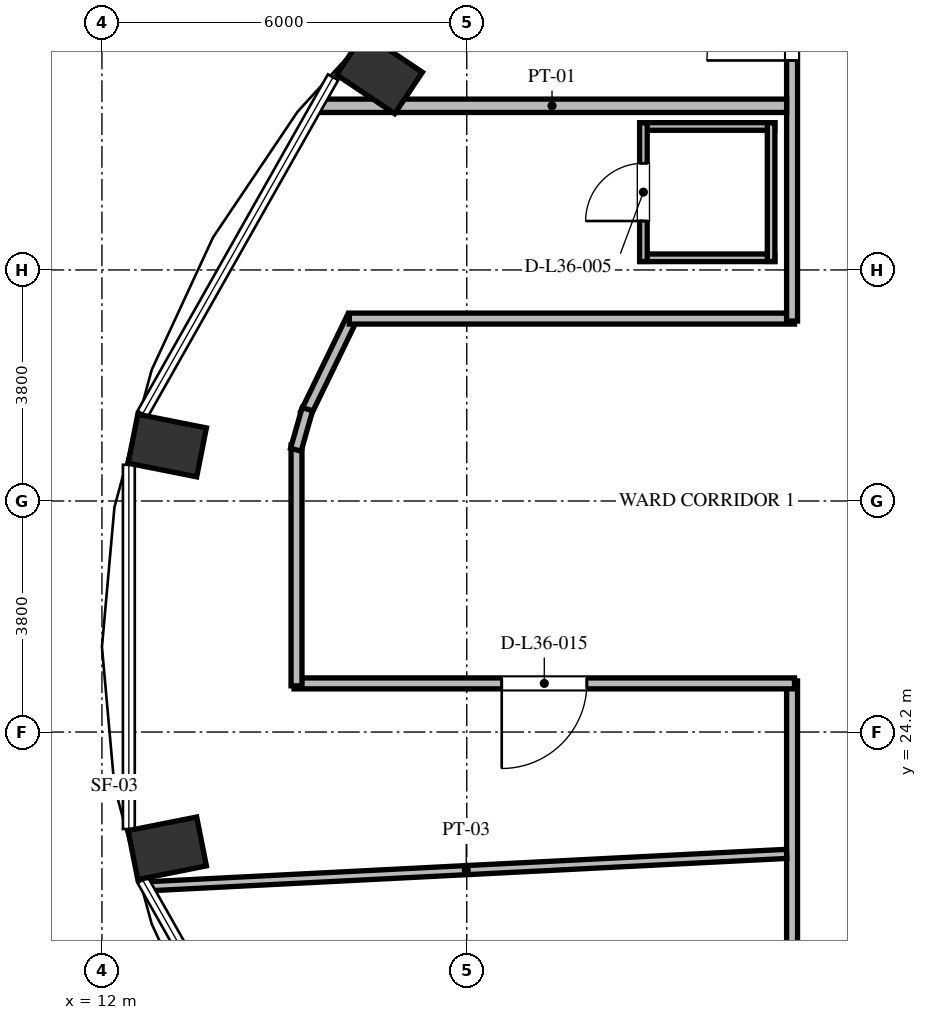
"""IFC4 building model, lengths in metres.
Left out: names, types, materials, properties, quantities, classifications, styles, units other than length and angle.
Written with IfcOpenShell. Run it as: python <this file> out.ifc"""

import sys

from ifc_helpers import new_model, si_unit, direction, frame, frame_2d, origin, origin_2d, place, context, subcontext, project, spatial, rectangle, extrude, element, fill, save


model = new_model("IFC4")
c1 = context("Model", 3, precision=1e-05, world=origin(), true_north=direction((0.0, 1.0)))
c2 = subcontext(c1, "Body", "Model", "MODEL_VIEW")
j1 = project(units=[si_unit("LENGTHUNIT", "METRE"), si_unit("PLANEANGLEUNIT", "RADIAN")], contexts=[c1])
p1 = place(None, origin())
s1 = spatial("IfcSite", under=j1, at=p1, CompositionType="ELEMENT")
p2 = place(p1, origin())
s2 = spatial("IfcBuilding", under=s1, at=p2, CompositionType="ELEMENT")
p3 = place(p2, frame((0.0, 0.0, 141.936)))
s3 = spatial("IfcBuildingStorey", under=s2, at=p3, CompositionType="ELEMENT", Elevation=141.936)
for number, where, z_axis, x_axis in (
    (1, (16.564, 35.031, 0.0), (0.0, 0.0, 1.0), (-0.831, 0.556, 0.0)),
    (2, (13.074, 28.912, 0.0), (0.0, 0.0, 1.0), (-0.981, 0.195, 0.0)),
    (3, (13.074, 22.288, 0.0), (0.0, 0.0, 1.0), (-0.981, -0.195, 0.0)),
):
    element("IfcColumn", number, at=place(p3, frame(where, z_axis=z_axis, x_axis=x_axis)), inside=s3, PredefinedType="COLUMN", context=c2, shape_type="SweptSolid", body=[
        extrude(rectangle(XDim=1.15, YDim=0.82, at=origin_2d()), origin(), (0.0, 0.0, 1.0), 3.648),
    ])
p4 = place(p3, frame((15.35, 29.436, 0.0), z_axis=(0.0, 0.0, 1.0), x_axis=(0.436196025907, 0.899851669434, 0.0)))
e4 = element("IfcWall", 4, at=p4, inside=s3, PredefinedType="PARTITIONING", context=c2, shape_type="SweptSolid", body=[
    extrude(rectangle(XDim=1.778, YDim=0.18, at=frame_2d((0.889, 0.0))), origin(), (0.0, 0.0, 1.0), 3.428),
])
p5 = place(p3, frame((16.068, 31.0, 0.0), z_axis=(0.0, 0.0, 1.0), x_axis=(1.0, 0.0, 0.0)))
e5 = element("IfcWall", 5, at=p5, inside=s3, PredefinedType="PARTITIONING", context=c2, shape_type="SweptSolid", body=[
    extrude(rectangle(XDim=7.322, YDim=0.18, at=frame_2d((3.661, 0.0))), origin(), (0.0, 0.0, 1.0), 3.428),
])
p6 = place(p3, frame((23.35, 30.96, 0.0), z_axis=(0.0, 0.0, 1.0), x_axis=(0.0, 1.0, 0.0)))
e6 = element("IfcWall", 6, at=p6, inside=s3, PredefinedType="PARTITIONING", context=c2, shape_type="SweptSolid", body=[
    extrude(rectangle(XDim=6.714, YDim=0.18, at=frame_2d((3.357, 0.0))), origin(), (0.0, 0.0, 1.0), 3.428),
])
p7 = place(p6, frame((4.285, 0.0, 0.0)))
e7 = element("IfcOpeningElement", 7, at=p7, cuts=e6, PredefinedType="OPENING", context=c2, shape_type="SweptSolid", body=[
    extrude(rectangle(XDim=1.4, YDim=2.2, at=frame_2d((0.7, 1.1))), frame((0.0, 0.1, 0.0), z_axis=(0.0, -1.0, 0.0), x_axis=(1.0, 0.0, 0.0)), (0.0, 0.0, 1.0), 0.2),
])
p8 = place(p3, frame((23.35, 19.98, 0.0), z_axis=(0.0, 0.0, 1.0), x_axis=(0.0, 1.0, 0.0)))
e8 = element("IfcWall", 8, at=p8, inside=s3, PredefinedType="PARTITIONING", context=c2, shape_type="SweptSolid", body=[
    extrude(rectangle(XDim=5.06, YDim=0.18, at=frame_2d((2.53, 0.0))), origin(), (0.0, 0.0, 1.0), 3.428),
])
p9 = place(p3, frame((23.39, 25.0, 0.0), z_axis=(0.0, 0.0, 1.0), x_axis=(-1.0, 0.0, 0.0)))
e9 = element("IfcWall", 9, at=p9, inside=s3, PredefinedType="PARTITIONING", context=c2, shape_type="SweptSolid", body=[
    extrude(rectangle(XDim=8.23, YDim=0.18, at=frame_2d((4.115, 0.0))), origin(), (0.0, 0.0, 1.0), 3.428),
])
p10 = place(p9, frame((3.415, 0.0, 0.0)))
e10 = element("IfcOpeningElement", 10, at=p10, cuts=e9, PredefinedType="OPENING", context=c2, shape_type="SweptSolid", body=[
    extrude(rectangle(XDim=1.4, YDim=2.2, at=frame_2d((0.7, 1.1))), frame((0.0, 0.1, 0.0), z_axis=(0.0, -1.0, 0.0), x_axis=(1.0, 0.0, 0.0)), (0.0, 0.0, 1.0), 0.2),
])
p11 = place(p3, frame((15.2, 24.96, 0.0), z_axis=(0.0, 0.0, 1.0), x_axis=(0.0, 1.0, 0.0)))
e11 = element("IfcWall", 11, at=p11, inside=s3, PredefinedType="PARTITIONING", context=c2, shape_type="SweptSolid", body=[
    extrude(rectangle(XDim=3.961, YDim=0.18, at=frame_2d((1.98, 0.0))), origin(), (0.0, 0.0, 1.0), 3.428),
])
p12 = place(p3, frame((15.189, 28.843, 0.0), z_axis=(0.0, 0.0, 1.0), x_axis=(0.272862960331, 0.962052911684, 0.0)))
e12 = element("IfcWall", 12, at=p12, inside=s3, PredefinedType="PARTITIONING", context=c2, shape_type="SweptSolid", body=[
    extrude(rectangle(XDim=0.694, YDim=0.18, at=frame_2d((0.347, 0.0))), origin(), (0.0, 0.0, 1.0), 3.428),
])
p13 = place(p3, frame((12.723, 21.661, 0.0), z_axis=(0.0, 0.0, 1.0), x_axis=(0.998712791022, 0.050722391981, 0.0)))
e13 = element("IfcWall", 13, at=p13, inside=s3, PredefinedType="PARTITIONING", context=c2, shape_type="SweptSolid", body=[
    extrude(rectangle(XDim=10.551, YDim=0.15, at=frame_2d((5.275, 0.0))), origin(), (0.0, 0.0, 1.0), 2.863),
])
p14 = place(p3, frame((15.544, 34.5, 0.0), z_axis=(0.0, 0.0, 1.0), x_axis=(1.0, 0.0, 0.0)))
e14 = element("IfcWall", 14, at=p14, inside=s3, PredefinedType="PARTITIONING", context=c2, shape_type="SweptSolid", body=[
    extrude(rectangle(XDim=7.716, YDim=0.22, at=frame_2d((3.858, 0.0))), origin(), (0.0, 0.0, 1.0), 3.428),
])
for number, where, z_axis, x_axis in (
    (15, (20.845, 34.16, 0.0), (0.0, 0.0, 1.0), (1.0, 0.0, 0.0)),
    (16, (20.845, 32.0, 0.0), (0.0, 0.0, 1.0), (1.0, 0.0, 0.0)),
):
    element("IfcWall", number, at=place(p3, frame(where, z_axis=z_axis, x_axis=x_axis)), inside=s3, PredefinedType="PARTITIONING", context=c2, shape_type="SweptSolid", body=[
        extrude(rectangle(XDim=2.22, YDim=0.125, at=frame_2d((1.11, 0.0))), origin(), (0.0, 0.0, 1.0), 3.428),
    ])
p15 = place(p3, frame((23.005, 31.94, 0.0), z_axis=(0.0, 0.0, 1.0), x_axis=(0.0, 1.0, 0.0)))
e17 = element("IfcWall", 17, at=p15, inside=s3, PredefinedType="PARTITIONING", context=c2, shape_type="SweptSolid", body=[
    extrude(rectangle(XDim=2.28, YDim=0.125, at=frame_2d((1.14, 0.0))), origin(), (0.0, 0.0, 1.0), 3.428),
])
p16 = place(p3, frame((20.905, 31.94, 0.0), z_axis=(0.0, 0.0, 1.0), x_axis=(0.0, 1.0, 0.0)))
e18 = element("IfcWall", 18, at=p16, inside=s3, PredefinedType="PARTITIONING", context=c2, shape_type="SweptSolid", body=[
    extrude(rectangle(XDim=2.28, YDim=0.125, at=frame_2d((1.14, 0.0))), origin(), (0.0, 0.0, 1.0), 3.053),
])
p17 = place(p16, frame((0.665, 0.0, 0.0)))
e19 = element("IfcOpeningElement", 19, at=p17, cuts=e18, PredefinedType="OPENING", context=c2, shape_type="SweptSolid", body=[
    extrude(rectangle(XDim=0.95, YDim=2.1, at=frame_2d((0.475, 1.05))), frame((0.0, 0.073, 0.0), z_axis=(0.0, -1.0, 0.0), x_axis=(1.0, 0.0, 0.0)), (0.0, 0.0, 1.0), 0.145),
])
p18 = place(p17, origin())
e20 = element("IfcDoor", 20, at=p18, inside=s3, OperationType="SINGLE_SWING_LEFT", PredefinedType="DOOR", context=c2, shape_type="SweptSolid", body=[
    extrude(rectangle(XDim=0.95, YDim=2.1, at=frame_2d((0.475, 1.05))), frame((0.0, 0.025, 0.0), z_axis=(0.0, -1.0, 0.0), x_axis=(1.0, 0.0, 0.0)), (0.0, 0.0, 1.0), 0.05),
])
fill(e19, e20)
p19 = place(p10, origin())
e21 = element("IfcDoor", 21, at=p19, inside=s3, OperationType="SINGLE_SWING_RIGHT", PredefinedType="DOOR", context=c2, shape_type="SweptSolid", body=[
    extrude(rectangle(XDim=1.4, YDim=2.2, at=frame_2d((0.7, 1.1))), frame((0.0, 0.025, 0.0), z_axis=(0.0, -1.0, 0.0), x_axis=(1.0, 0.0, 0.0)), (0.0, 0.0, 1.0), 0.05),
])
fill(e10, e21)
p20 = place(p7, origin())
e22 = element("IfcDoor", 22, at=p20, inside=s3, OperationType="SINGLE_SWING_LEFT", PredefinedType="DOOR", context=c2, shape_type="SweptSolid", body=[
    extrude(rectangle(XDim=1.4, YDim=2.2, at=frame_2d((0.7, 1.1))), frame((0.0, 0.025, 0.0), z_axis=(0.0, -1.0, 0.0), x_axis=(1.0, 0.0, 0.0)), (0.0, 0.0, 1.0), 0.05),
])
fill(e7, e22)
save(model, sys.argv[1])
